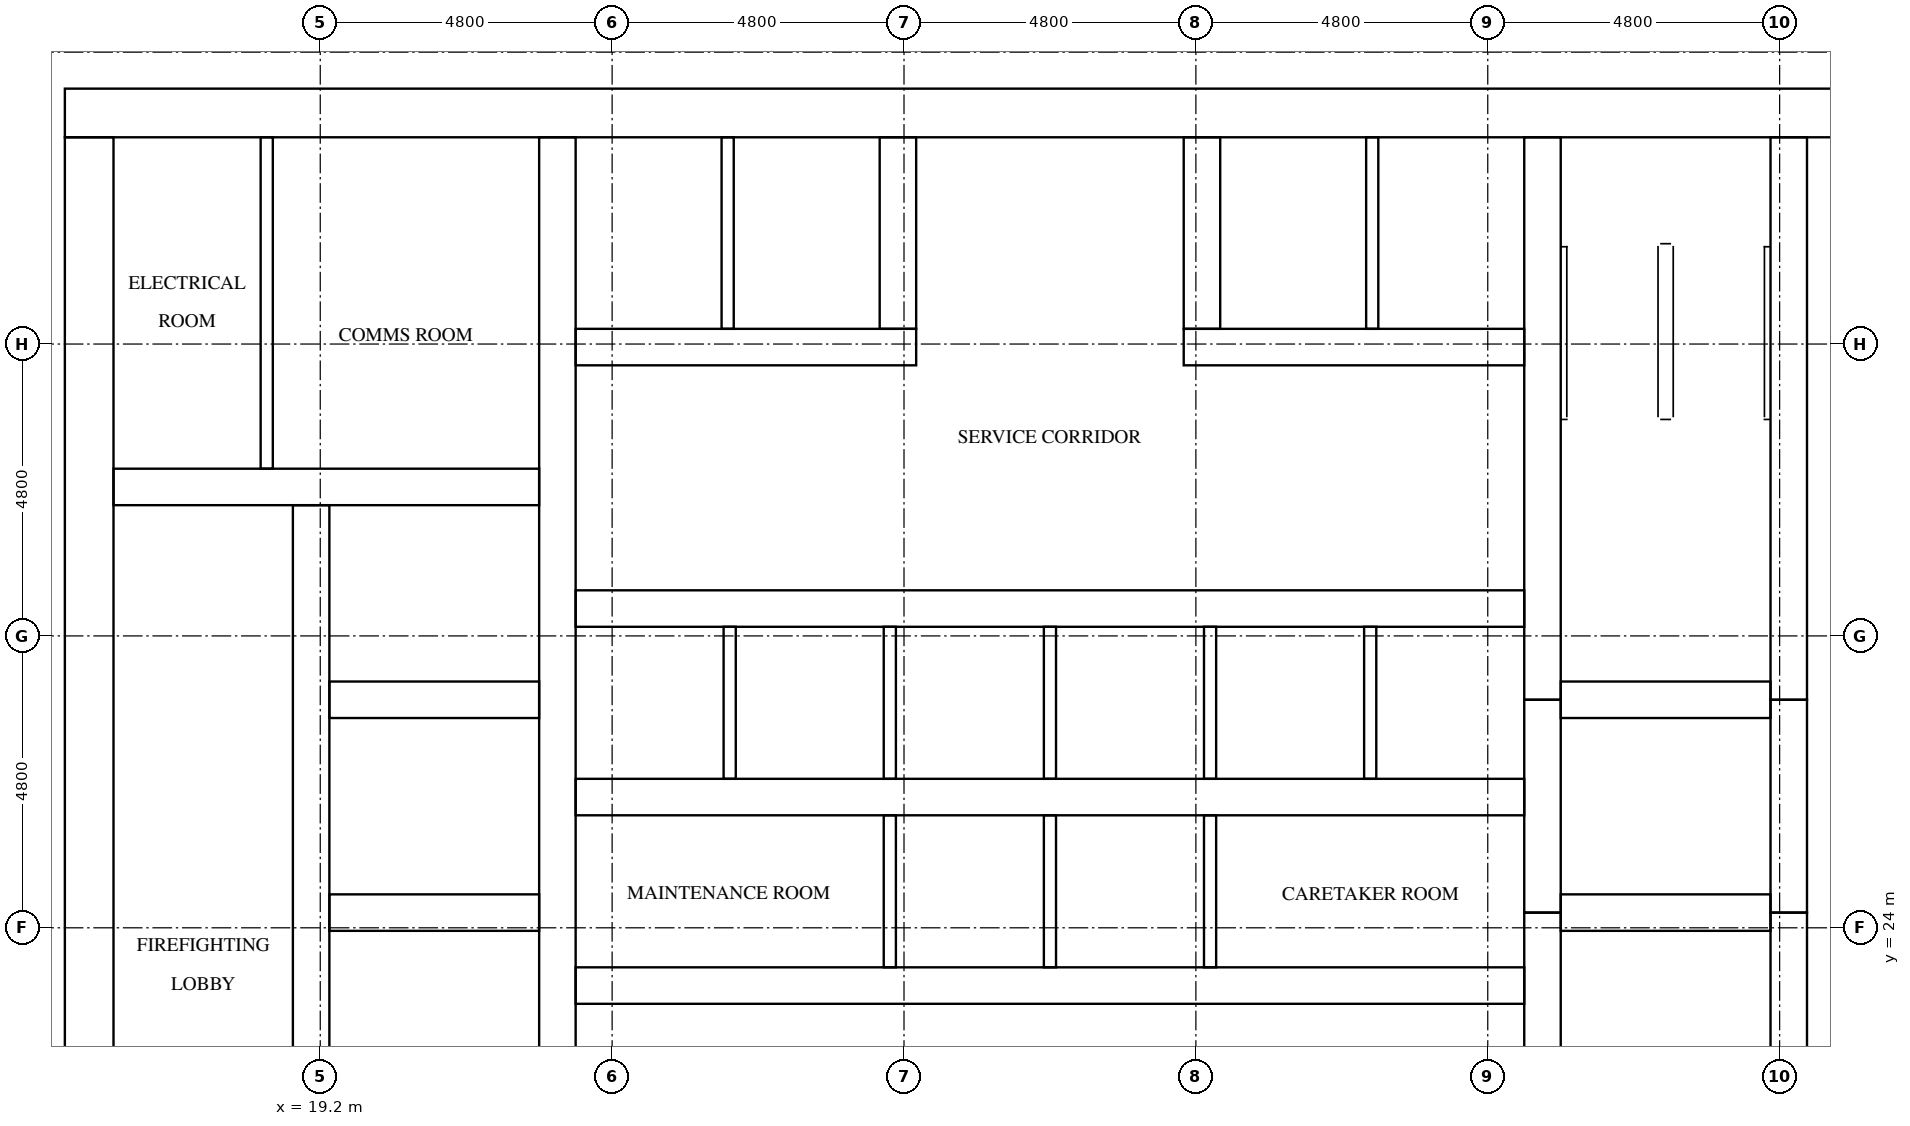
"""IFC4 building model, lengths in metres.
Left out: names, types, materials, properties, quantities, classifications, styles, units other than length and angle.
Written with IfcOpenShell. Run it as: python <this file> out.ifc"""

import sys

from ifc_helpers import new_model, si_unit, direction, frame, frame_2d, origin, place, context, subcontext, project, spatial, rectangle, extrude, element, fill, save


model = new_model("IFC4")
c1 = context("Model", 3, precision=1e-05, world=origin(), true_north=direction((0.0, 1.0)))
c2 = subcontext(c1, "Body", "Model", "MODEL_VIEW")
j1 = project(units=[si_unit("LENGTHUNIT", "METRE"), si_unit("PLANEANGLEUNIT", "RADIAN")], contexts=[c1])
p1 = place(None, origin())
s1 = spatial("IfcSite", under=j1, at=p1, CompositionType="ELEMENT")
p2 = place(p1, origin())
s2 = spatial("IfcBuilding", under=s1, at=p2, CompositionType="ELEMENT")
p3 = place(p2, frame((0.0, 0.0, 140.1)))
s3 = spatial("IfcBuildingStorey", under=s2, at=p3, CompositionType="ELEMENT", Elevation=140.1)
p4 = place(p3, frame((15.0, 37.4, 0.0), z_axis=(0.0, 0.0, 1.0), x_axis=(1.0, 0.0, 0.0)))
e1 = element("IfcWall", 1, at=p4, inside=s3, PredefinedType="SHEAR", context=c2, shape_type="SweptSolid", body=[
    extrude(rectangle(XDim=32.4, YDim=0.8, at=frame_2d((16.2, 0.0))), origin(), (0.0, 0.0, 1.0), 3.1),
])
p5 = place(p4, frame((15.3, 0.0, 0.0)))
e2 = element("IfcOpeningElement", 2, at=p5, cuts=e1, PredefinedType="OPENING", context=c2, shape_type="SweptSolid", body=[
    extrude(rectangle(XDim=1.8, YDim=2.1, at=frame_2d((0.9, 1.05))), frame((0.0, 0.41, 0.0), z_axis=(0.0, -1.0, 0.0), x_axis=(1.0, 0.0, 0.0)), (0.0, 0.0, 1.0), 0.82),
])
p6 = place(p4, frame((1.51, 0.0, 0.0)))
e3 = element("IfcOpeningElement", 3, at=p6, cuts=e1, PredefinedType="OPENING", context=c2, shape_type="SweptSolid", body=[
    extrude(rectangle(XDim=1.0, YDim=2.1, at=frame_2d((0.5, 1.05))), frame((0.0, 0.41, 0.0), z_axis=(0.0, -1.0, 0.0), x_axis=(1.0, 0.0, 0.0)), (0.0, 0.0, 1.0), 0.82),
])
p7 = place(p4, frame((5.11, 0.0, 0.0)))
e4 = element("IfcOpeningElement", 4, at=p7, cuts=e1, PredefinedType="OPENING", context=c2, shape_type="SweptSolid", body=[
    extrude(rectangle(XDim=1.0, YDim=2.1, at=frame_2d((0.5, 1.05))), frame((0.0, 0.41, 0.0), z_axis=(0.0, -1.0, 0.0), x_axis=(1.0, 0.0, 0.0)), (0.0, 0.0, 1.0), 0.82),
])
p8 = place(p3, frame((15.4, 15.8, 0.0), z_axis=(0.0, 0.0, 1.0), x_axis=(0.0, 1.0, 0.0)))
e5 = element("IfcWall", 5, at=p8, inside=s3, PredefinedType="SHEAR", context=c2, shape_type="SweptSolid", body=[
    extrude(rectangle(XDim=21.2, YDim=0.8, at=frame_2d((10.6, 0.0))), origin(), (0.0, 0.0, 1.0), 3.1),
])
p9 = place(p8, frame((4.96, 0.0, 0.0)))
e6 = element("IfcOpeningElement", 6, at=p9, cuts=e5, PredefinedType="OPENING", context=c2, shape_type="SweptSolid", body=[
    extrude(rectangle(XDim=1.2, YDim=2.1, at=frame_2d((0.6, 1.05))), frame((0.0, 0.41, 0.0), z_axis=(0.0, -1.0, 0.0), x_axis=(1.0, 0.0, 0.0)), (0.0, 0.0, 1.0), 0.82),
])
p10 = place(p3, frame((19.05, 15.8, 0.0), z_axis=(0.0, 0.0, 1.0), x_axis=(0.0, 1.0, 0.0)))
e7 = element("IfcWall", 7, at=p10, inside=s3, PredefinedType="SHEAR", context=c2, shape_type="SweptSolid", body=[
    extrude(rectangle(XDim=15.15, YDim=0.6, at=frame_2d((7.575, 0.0))), origin(), (0.0, 0.0, 1.0), 3.1),
])
p11 = place(p10, frame((9.65, 0.0, 0.0)))
e8 = element("IfcOpeningElement", 8, at=p11, cuts=e7, PredefinedType="OPENING", context=c2, shape_type="SweptSolid", body=[
    extrude(rectangle(XDim=1.1, YDim=2.1, at=frame_2d((0.55, 1.05))), frame((0.0, 0.31, 0.0), z_axis=(0.0, -1.0, 0.0), x_axis=(1.0, 0.0, 0.0)), (0.0, 0.0, 1.0), 0.62),
])
p12 = place(p10, frame((13.15, 0.0, 0.0)))
e9 = element("IfcOpeningElement", 9, at=p12, cuts=e7, PredefinedType="OPENING", context=c2, shape_type="SweptSolid", body=[
    extrude(rectangle(XDim=1.1, YDim=2.1, at=frame_2d((0.55, 1.05))), frame((0.0, 0.31, 0.0), z_axis=(0.0, -1.0, 0.0), x_axis=(1.0, 0.0, 0.0)), (0.0, 0.0, 1.0), 0.62),
])
p13 = place(p10, frame((0.4, 0.0, 0.0)))
e10 = element("IfcOpeningElement", 10, at=p13, cuts=e7, PredefinedType="OPENING", context=c2, shape_type="SweptSolid", body=[
    extrude(rectangle(XDim=1.2, YDim=2.1, at=frame_2d((0.6, 1.05))), frame((0.0, 0.31, 0.0), z_axis=(0.0, -1.0, 0.0), x_axis=(1.0, 0.0, 0.0)), (0.0, 0.0, 1.0), 0.62),
])
p14 = place(p3, frame((23.1, 15.8, 0.0), z_axis=(0.0, 0.0, 1.0), x_axis=(0.0, 1.0, 0.0)))
e11 = element("IfcWall", 11, at=p14, inside=s3, PredefinedType="SHEAR", context=c2, shape_type="SweptSolid", body=[
    extrude(rectangle(XDim=21.2, YDim=0.6, at=frame_2d((10.6, 0.0))), origin(), (0.0, 0.0, 1.0), 3.1),
])
p15 = place(p3, frame((39.3, 15.8, 0.0), z_axis=(0.0, 0.0, 1.0), x_axis=(0.0, 1.0, 0.0)))
e12 = element("IfcWall", 12, at=p15, inside=s3, PredefinedType="SHEAR", context=c2, shape_type="SweptSolid", body=[
    extrude(rectangle(XDim=8.45, YDim=0.6, at=frame_2d((4.225, 0.0))), origin(), (0.0, 0.0, 1.0), 3.1),
])
p16 = place(p3, frame((39.3, 24.25, 0.0), z_axis=(0.0, 0.0, 1.0), x_axis=(0.0, 1.0, 0.0)))
e13 = element("IfcWall", 13, at=p16, inside=s3, PredefinedType="SHEAR", context=c2, shape_type="SweptSolid", body=[
    extrude(rectangle(XDim=3.5, YDim=0.6, at=frame_2d((1.75, 0.0))), origin(), (0.0, 0.0, 1.0), 3.1),
])
p17 = place(p3, frame((39.3, 27.75, 0.0), z_axis=(0.0, 0.0, 1.0), x_axis=(0.0, 1.0, 0.0)))
e14 = element("IfcWall", 14, at=p17, inside=s3, PredefinedType="SHEAR", context=c2, shape_type="SweptSolid", body=[
    extrude(rectangle(XDim=9.25, YDim=0.6, at=frame_2d((4.625, 0.0))), origin(), (0.0, 0.0, 1.0), 3.1),
])
p18 = place(p3, frame((43.35, 15.8, 0.0), z_axis=(0.0, 0.0, 1.0), x_axis=(0.0, 1.0, 0.0)))
e15 = element("IfcWall", 15, at=p18, inside=s3, PredefinedType="SHEAR", context=c2, shape_type="SweptSolid", body=[
    extrude(rectangle(XDim=8.45, YDim=0.6, at=frame_2d((4.225, 0.0))), origin(), (0.0, 0.0, 1.0), 3.1),
])
p19 = place(p18, frame((0.4, 0.0, 0.0)))
e16 = element("IfcOpeningElement", 16, at=p19, cuts=e15, PredefinedType="OPENING", context=c2, shape_type="SweptSolid", body=[
    extrude(rectangle(XDim=1.2, YDim=2.1, at=frame_2d((0.6, 1.05))), frame((0.0, 0.31, 0.0), z_axis=(0.0, -1.0, 0.0), x_axis=(1.0, 0.0, 0.0)), (0.0, 0.0, 1.0), 0.62),
])
p20 = place(p3, frame((43.35, 24.25, 0.0), z_axis=(0.0, 0.0, 1.0), x_axis=(0.0, 1.0, 0.0)))
e17 = element("IfcWall", 17, at=p20, inside=s3, PredefinedType="SHEAR", context=c2, shape_type="SweptSolid", body=[
    extrude(rectangle(XDim=3.5, YDim=0.6, at=frame_2d((1.75, 0.0))), origin(), (0.0, 0.0, 1.0), 3.1),
])
p21 = place(p20, frame((1.2, 0.0, 0.0)))
e18 = element("IfcOpeningElement", 18, at=p21, cuts=e17, PredefinedType="OPENING", context=c2, shape_type="SweptSolid", body=[
    extrude(rectangle(XDim=1.1, YDim=2.1, at=frame_2d((0.55, 1.05))), frame((0.0, 0.31, 0.0), z_axis=(0.0, -1.0, 0.0), x_axis=(1.0, 0.0, 0.0)), (0.0, 0.0, 1.0), 0.62),
])
p22 = place(p3, frame((43.35, 27.75, 0.0), z_axis=(0.0, 0.0, 1.0), x_axis=(0.0, 1.0, 0.0)))
e19 = element("IfcWall", 19, at=p22, inside=s3, PredefinedType="SHEAR", context=c2, shape_type="SweptSolid", body=[
    extrude(rectangle(XDim=9.25, YDim=0.6, at=frame_2d((4.625, 0.0))), origin(), (0.0, 0.0, 1.0), 3.1),
])
p23 = place(p22, frame((7.65, 0.0, 0.0)))
e20 = element("IfcOpeningElement", 20, at=p23, cuts=e19, PredefinedType="OPENING", context=c2, shape_type="SweptSolid", body=[
    extrude(rectangle(XDim=1.2, YDim=2.1, at=frame_2d((0.6, 1.05))), frame((0.0, 0.31, 0.0), z_axis=(0.0, -1.0, 0.0), x_axis=(1.0, 0.0, 0.0)), (0.0, 0.0, 1.0), 0.62),
])
for number, where, z_axis, x_axis in (
    (21, (19.35, 24.25, 0.0), (0.0, 0.0, 1.0), (1.0, 0.0, 0.0)),
    (22, (19.35, 27.75, 0.0), (0.0, 0.0, 1.0), (1.0, 0.0, 0.0)),
):
    element("IfcWall", number, at=place(p3, frame(where, z_axis=z_axis, x_axis=x_axis)), inside=s3, PredefinedType="SHEAR", context=c2, shape_type="SweptSolid", body=[
        extrude(rectangle(XDim=3.45, YDim=0.6, at=frame_2d((1.725, 0.0))), origin(), (0.0, 0.0, 1.0), 3.1),
    ])
p24 = place(p3, frame((15.8, 31.25, 0.0), z_axis=(0.0, 0.0, 1.0), x_axis=(1.0, 0.0, 0.0)))
e23 = element("IfcWall", 23, at=p24, inside=s3, PredefinedType="SHEAR", context=c2, shape_type="SweptSolid", body=[
    extrude(rectangle(XDim=7.0, YDim=0.6, at=frame_2d((3.5, 0.0))), origin(), (0.0, 0.0, 1.0), 3.1),
])
for number, where, z_axis, x_axis in (
    (24, (39.6, 24.25, 0.0), (0.0, 0.0, 1.0), (1.0, 0.0, 0.0)),
    (25, (39.6, 27.75, 0.0), (0.0, 0.0, 1.0), (1.0, 0.0, 0.0)),
):
    element("IfcWall", number, at=place(p3, frame(where, z_axis=z_axis, x_axis=x_axis)), inside=s3, PredefinedType="SHEAR", context=c2, shape_type="SweptSolid", body=[
        extrude(rectangle(XDim=3.45, YDim=0.6, at=frame_2d((1.725, 0.0))), origin(), (0.0, 0.0, 1.0), 3.1),
    ])
p25 = place(p3, frame((23.4, 23.05, 0.0), z_axis=(0.0, 0.0, 1.0), x_axis=(1.0, 0.0, 0.0)))
e26 = element("IfcWall", 26, at=p25, inside=s3, PredefinedType="SHEAR", context=c2, shape_type="SweptSolid", body=[
    extrude(rectangle(XDim=15.6, YDim=0.6, at=frame_2d((7.8, 0.0))), origin(), (0.0, 0.0, 1.0), 3.1),
])
p26 = place(p25, frame((2.033, 0.0, 0.0)))
e27 = element("IfcOpeningElement", 27, at=p26, cuts=e26, PredefinedType="OPENING", context=c2, shape_type="SweptSolid", body=[
    extrude(rectangle(XDim=1.0, YDim=2.1, at=frame_2d((0.5, 1.05))), frame((0.0, 0.31, 0.0), z_axis=(0.0, -1.0, 0.0), x_axis=(1.0, 0.0, 0.0)), (0.0, 0.0, 1.0), 0.62),
])
p27 = place(p25, frame((12.567, 0.0, 0.0)))
e28 = element("IfcOpeningElement", 28, at=p27, cuts=e26, PredefinedType="OPENING", context=c2, shape_type="SweptSolid", body=[
    extrude(rectangle(XDim=1.0, YDim=2.1, at=frame_2d((0.5, 1.05))), frame((0.0, 0.31, 0.0), z_axis=(0.0, -1.0, 0.0), x_axis=(1.0, 0.0, 0.0)), (0.0, 0.0, 1.0), 0.62),
])
for number, where, z_axis, x_axis in (
    (29, (23.4, 26.15, 0.0), (0.0, 0.0, 1.0), (1.0, 0.0, 0.0)),
    (30, (23.4, 29.25, 0.0), (0.0, 0.0, 1.0), (1.0, 0.0, 0.0)),
):
    element("IfcWall", number, at=place(p3, frame(where, z_axis=z_axis, x_axis=x_axis)), inside=s3, PredefinedType="SHEAR", context=c2, shape_type="SweptSolid", body=[
        extrude(rectangle(XDim=15.6, YDim=0.6, at=frame_2d((7.8, 0.0))), origin(), (0.0, 0.0, 1.0), 3.1),
    ])
for number, where, z_axis, x_axis in (
    (31, (23.4, 33.55, 0.0), (0.0, 0.0, 1.0), (1.0, 0.0, 0.0)),
    (32, (33.4, 33.55, 0.0), (0.0, 0.0, 1.0), (1.0, 0.0, 0.0)),
):
    element("IfcWall", number, at=place(p3, frame(where, z_axis=z_axis, x_axis=x_axis)), inside=s3, PredefinedType="SHEAR", context=c2, shape_type="SweptSolid", body=[
        extrude(rectangle(XDim=5.6, YDim=0.6, at=frame_2d((2.8, 0.0))), origin(), (0.0, 0.0, 1.0), 3.1),
    ])
for number, where, z_axis, x_axis in (
    (33, (28.7, 33.85, 0.0), (0.0, 0.0, 1.0), (0.0, 1.0, 0.0)),
    (34, (33.7, 33.85, 0.0), (0.0, 0.0, 1.0), (0.0, 1.0, 0.0)),
):
    element("IfcWall", number, at=place(p3, frame(where, z_axis=z_axis, x_axis=x_axis)), inside=s3, PredefinedType="SHEAR", context=c2, shape_type="SweptSolid", body=[
        extrude(rectangle(XDim=3.15, YDim=0.6, at=frame_2d((1.575, 0.0))), origin(), (0.0, 0.0, 1.0), 3.1),
    ])
for number, where, z_axis, x_axis in (
    (35, (25.933, 26.45, 0.0), (0.0, 0.0, 1.0), (0.0, 1.0, 0.0)),
    (36, (28.567, 23.35, 0.0), (0.0, 0.0, 1.0), (0.0, 1.0, 0.0)),
    (37, (28.567, 26.45, 0.0), (0.0, 0.0, 1.0), (0.0, 1.0, 0.0)),
    (38, (31.2, 23.35, 0.0), (0.0, 0.0, 1.0), (0.0, 1.0, 0.0)),
    (39, (31.2, 26.45, 0.0), (0.0, 0.0, 1.0), (0.0, 1.0, 0.0)),
    (40, (33.833, 23.35, 0.0), (0.0, 0.0, 1.0), (0.0, 1.0, 0.0)),
    (41, (33.833, 26.45, 0.0), (0.0, 0.0, 1.0), (0.0, 1.0, 0.0)),
    (42, (36.467, 26.45, 0.0), (0.0, 0.0, 1.0), (0.0, 1.0, 0.0)),
):
    element("IfcWall", number, at=place(p3, frame(where, z_axis=z_axis, x_axis=x_axis)), inside=s3, PredefinedType="SOLIDWALL", context=c2, shape_type="SweptSolid", body=[
        extrude(rectangle(XDim=2.5, YDim=0.2, at=frame_2d((1.25, 0.0))), origin(), (0.0, 0.0, 1.0), 3.1),
    ])
for number, where, z_axis, x_axis in (
    (43, (25.9, 33.85, 0.0), (0.0, 0.0, 1.0), (0.0, 1.0, 0.0)),
    (44, (36.5, 33.85, 0.0), (0.0, 0.0, 1.0), (0.0, 1.0, 0.0)),
):
    element("IfcWall", number, at=place(p3, frame(where, z_axis=z_axis, x_axis=x_axis)), inside=s3, PredefinedType="SOLIDWALL", context=c2, shape_type="SweptSolid", body=[
        extrude(rectangle(XDim=3.15, YDim=0.2, at=frame_2d((1.575, 0.0))), origin(), (0.0, 0.0, 1.0), 3.1),
    ])
p28 = place(p3, frame((18.32, 31.55, 0.0), z_axis=(0.0, 0.0, 1.0), x_axis=(0.0, 1.0, 0.0)))
e45 = element("IfcWall", 45, at=p28, inside=s3, PredefinedType="PARTITIONING", context=c2, shape_type="SweptSolid", body=[
    extrude(rectangle(XDim=5.45, YDim=0.2, at=frame_2d((2.725, 0.0))), origin(), (0.0, 0.0, 1.0), 3.1),
])
p29 = place(p11, origin())
e46 = element("IfcDoor", 46, at=p29, inside=s3, OperationType="DOUBLE_DOOR_SLIDING", PredefinedType="DOOR", context=c2, shape_type="SweptSolid", body=[
    extrude(rectangle(XDim=1.1, YDim=2.1, at=frame_2d((0.55, 1.05))), frame((0.0, 0.025, 0.0), z_axis=(0.0, -1.0, 0.0), x_axis=(1.0, 0.0, 0.0)), (0.0, 0.0, 1.0), 0.05),
])
fill(e8, e46)
p30 = place(p12, origin())
e47 = element("IfcDoor", 47, at=p30, inside=s3, OperationType="DOUBLE_DOOR_SLIDING", PredefinedType="DOOR", context=c2, shape_type="SweptSolid", body=[
    extrude(rectangle(XDim=1.1, YDim=2.1, at=frame_2d((0.55, 1.05))), frame((0.0, 0.025, 0.0), z_axis=(0.0, -1.0, 0.0), x_axis=(1.0, 0.0, 0.0)), (0.0, 0.0, 1.0), 0.05),
])
fill(e9, e47)
p31 = place(p21, origin())
e48 = element("IfcDoor", 48, at=p31, inside=s3, OperationType="DOUBLE_DOOR_SLIDING", PredefinedType="DOOR", context=c2, shape_type="SweptSolid", body=[
    extrude(rectangle(XDim=1.1, YDim=2.1, at=frame_2d((0.55, 1.05))), frame((0.0, 0.025, 0.0), z_axis=(0.0, -1.0, 0.0), x_axis=(1.0, 0.0, 0.0)), (0.0, 0.0, 1.0), 0.05),
])
fill(e18, e48)
p32 = place(p23, origin())
e49 = element("IfcDoor", 49, at=p32, inside=s3, OperationType="SINGLE_SWING_RIGHT", PredefinedType="DOOR", context=c2, shape_type="SweptSolid", body=[
    extrude(rectangle(XDim=1.2, YDim=2.1, at=frame_2d((0.6, 1.05))), frame((0.0, 0.025, 0.0), z_axis=(0.0, -1.0, 0.0), x_axis=(1.0, 0.0, 0.0)), (0.0, 0.0, 1.0), 0.05),
])
fill(e20, e49)
p33 = place(p5, origin())
e50 = element("IfcDoor", 50, at=p33, inside=s3, OperationType="DOUBLE_DOOR_SINGLE_SWING", PredefinedType="DOOR", context=c2, shape_type="SweptSolid", body=[
    extrude(rectangle(XDim=1.8, YDim=2.1, at=frame_2d((0.9, 1.05))), frame((0.0, 0.025, 0.0), z_axis=(0.0, -1.0, 0.0), x_axis=(1.0, 0.0, 0.0)), (0.0, 0.0, 1.0), 0.05),
])
fill(e2, e50)
p34 = place(p6, origin())
e51 = element("IfcDoor", 51, at=p34, inside=s3, OperationType="SINGLE_SWING_LEFT", PredefinedType="DOOR", context=c2, shape_type="SweptSolid", body=[
    extrude(rectangle(XDim=1.0, YDim=2.1, at=frame_2d((0.5, 1.05))), frame((0.0, 0.025, 0.0), z_axis=(0.0, -1.0, 0.0), x_axis=(1.0, 0.0, 0.0)), (0.0, 0.0, 1.0), 0.05),
])
fill(e3, e51)
p35 = place(p7, origin())
e52 = element("IfcDoor", 52, at=p35, inside=s3, OperationType="SINGLE_SWING_RIGHT", PredefinedType="DOOR", context=c2, shape_type="SweptSolid", body=[
    extrude(rectangle(XDim=1.0, YDim=2.1, at=frame_2d((0.5, 1.05))), frame((0.0, 0.025, 0.0), z_axis=(0.0, -1.0, 0.0), x_axis=(1.0, 0.0, 0.0)), (0.0, 0.0, 1.0), 0.05),
])
fill(e4, e52)
p36 = place(p26, frame((1.0, 0.0, 0.0), z_axis=(0.0, 0.0, 1.0), x_axis=(-1.0, 0.0, 0.0)))
e53 = element("IfcDoor", 53, at=p36, inside=s3, OperationType="SINGLE_SWING_LEFT", PredefinedType="DOOR", context=c2, shape_type="SweptSolid", body=[
    extrude(rectangle(XDim=1.0, YDim=2.1, at=frame_2d((0.5, 1.05))), frame((0.0, 0.025, 0.0), z_axis=(0.0, -1.0, 0.0), x_axis=(1.0, 0.0, 0.0)), (0.0, 0.0, 1.0), 0.05),
])
fill(e27, e53)
p37 = place(p27, frame((1.0, 0.0, 0.0), z_axis=(0.0, 0.0, 1.0), x_axis=(-1.0, 0.0, 0.0)))
e54 = element("IfcDoor", 54, at=p37, inside=s3, OperationType="SINGLE_SWING_RIGHT", PredefinedType="DOOR", context=c2, shape_type="SweptSolid", body=[
    extrude(rectangle(XDim=1.0, YDim=2.1, at=frame_2d((0.5, 1.05))), frame((0.0, 0.025, 0.0), z_axis=(0.0, -1.0, 0.0), x_axis=(1.0, 0.0, 0.0)), (0.0, 0.0, 1.0), 0.05),
])
fill(e28, e54)
save(model, sys.argv[1])
